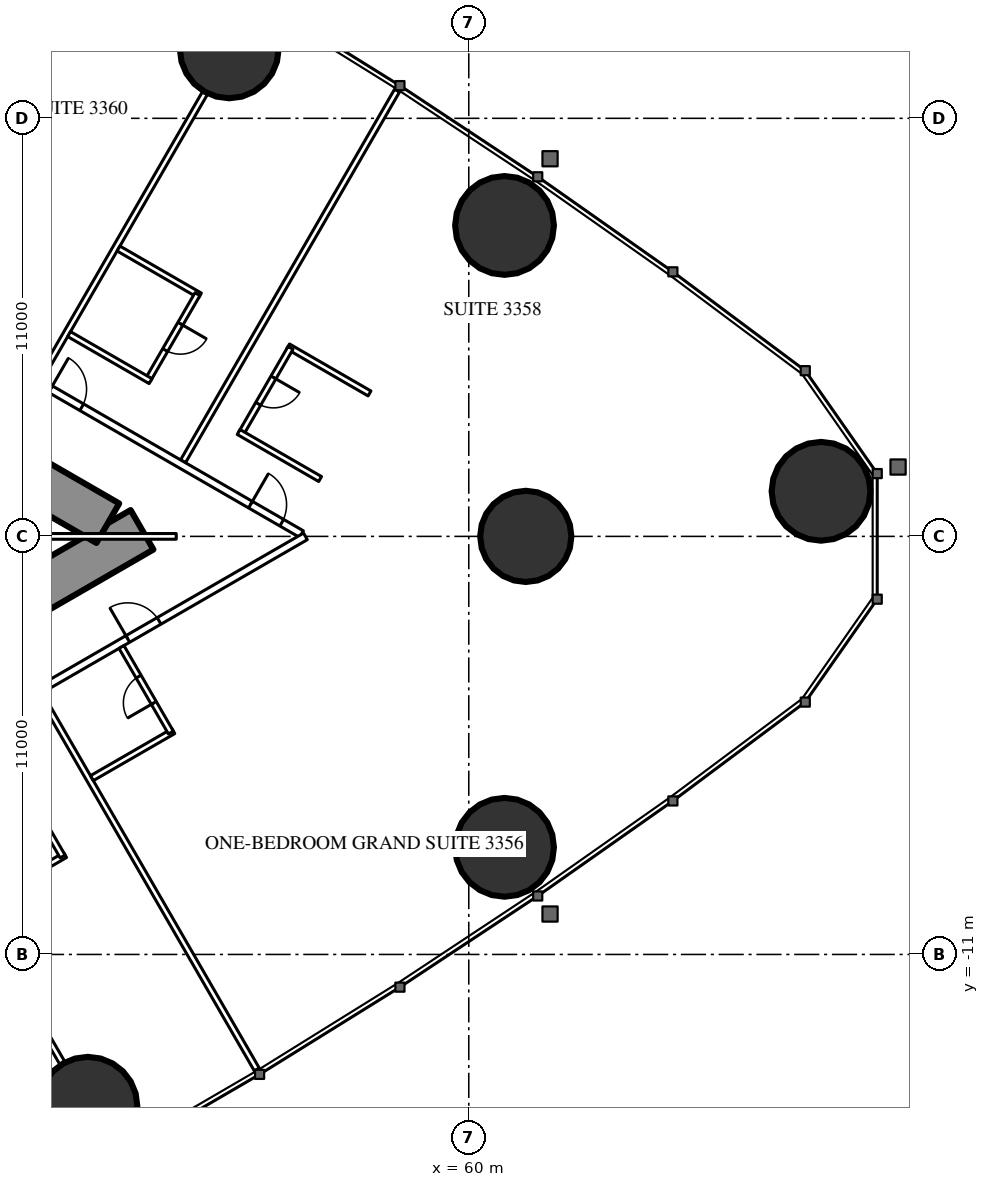
"""IFC4 building model, lengths in metres.
Left out: names, types, materials, properties, quantities, classifications, styles, units other than length and angle.
Written with IfcOpenShell. Run it as: python <this file> out.ifc"""

import sys

from ifc_helpers import new_model, si_unit, direction, frame, frame_2d, origin, origin_2d, place, context, subcontext, project, spatial, rectangle, circle, hollow_circle, extrude, element, fill, save


model = new_model("IFC4")
c1 = context("Model", 3, precision=1e-05, world=origin(), true_north=direction((0.0, 1.0)))
c2 = subcontext(c1, "Body", "Model", "MODEL_VIEW")
j1 = project(units=[si_unit("LENGTHUNIT", "METRE"), si_unit("PLANEANGLEUNIT", "RADIAN")], contexts=[c1])
p1 = place(None, origin())
s1 = spatial("IfcSite", under=j1, at=p1, CompositionType="ELEMENT")
p2 = place(p1, origin())
s2 = spatial("IfcBuilding", under=s1, at=p2, CompositionType="ELEMENT")
p3 = place(p2, frame((0.0, 0.0, 125.6)))
s3 = spatial("IfcBuildingStorey", under=s2, at=p3, CompositionType="ELEMENT", Elevation=125.6)
for number, where, z_axis, x_axis in (
    (1, (69.269, 1.187, 0.0), (0.0, 0.0, 1.0), (1.0, 0.0, 0.0)),
    (2, (60.941, 8.181, 0.0), (0.0, 0.0, 1.0), (1.0, 0.0, 0.0)),
    (3, (53.697, 12.827, 0.0), (0.0, 0.0, 1.0), (1.0, 0.0, 0.0)),
    (4, (49.979, -14.994, 0.0), (0.0, 0.0, 1.0), (1.0, 0.0, 0.0)),
    (5, (60.941, -8.181, 0.0), (0.0, 0.0, 1.0), (1.0, 0.0, 0.0)),
):
    element("IfcColumn", number, at=place(p3, frame(where, z_axis=z_axis, x_axis=x_axis)), inside=s3, PredefinedType="COLUMN", context=c2, shape_type="SweptSolid", body=[
        extrude(hollow_circle(Radius=1.3, WallThickness=0.1, at=origin_2d()), origin(), (0.0, 0.0, 1.0), 3.5),
    ])
p4 = place(p3, frame((61.5, 0.0, 0.0), z_axis=(0.0, 0.0, 1.0), x_axis=(1.0, 0.0, 0.0)))
e6 = element("IfcColumn", 6, at=p4, inside=s3, PredefinedType="COLUMN", context=c2, shape_type="SweptSolid", body=[
    extrude(circle(Radius=1.2, at=origin_2d()), origin(), (0.0, 0.0, 1.0), 3.5),
])
p5 = place(p3, frame((27.2, -13.8, 0.0), z_axis=(0.0, 0.0, 1.0), x_axis=(0.866027159892, 0.499996958321, 0.0)))
e7 = element("IfcWall", 7, at=p5, inside=s3, PredefinedType="SHEAR", context=c2, shape_type="SweptSolid", body=[
    extrude(rectangle(XDim=27.947, YDim=1.2, at=frame_2d((13.973, 0.0))), origin(), (0.0, 0.0, 1.0), 3.5),
])
p6 = place(p5, frame((4.6, 0.0, 0.0)))
e8 = element("IfcOpeningElement", 8, at=p6, cuts=e7, PredefinedType="OPENING", context=c2, shape_type="SweptSolid", body=[
    extrude(rectangle(XDim=1.0, YDim=2.2, at=frame_2d((0.5, 1.1))), frame((0.0, 0.61, 0.0), z_axis=(0.0, -1.0, 0.0), x_axis=(1.0, 0.0, 0.0)), (0.0, 0.0, 1.0), 1.22),
])
p7 = place(p5, frame((13.395, 0.0, 0.0)))
e9 = element("IfcOpeningElement", 9, at=p7, cuts=e7, PredefinedType="OPENING", context=c2, shape_type="SweptSolid", body=[
    extrude(rectangle(XDim=1.8, YDim=2.2, at=frame_2d((0.9, 1.1))), frame((0.0, 0.61, 0.0), z_axis=(0.0, -1.0, 0.0), x_axis=(1.0, 0.0, 0.0)), (0.0, 0.0, 1.0), 1.22),
])
p8 = place(p3, frame((27.2, 13.8, 0.0), z_axis=(0.0, 0.0, 1.0), x_axis=(0.866024515034, -0.500001539357, 0.0)))
e10 = element("IfcWall", 10, at=p8, inside=s3, PredefinedType="SHEAR", context=c2, shape_type="SweptSolid", body=[
    extrude(rectangle(XDim=26.907, YDim=1.2, at=frame_2d((13.454, 0.0))), origin(), (0.0, 0.0, 1.0), 3.5),
])
p9 = place(p8, frame((4.6, 0.0, 0.0)))
e11 = element("IfcOpeningElement", 11, at=p9, cuts=e10, PredefinedType="OPENING", context=c2, shape_type="SweptSolid", body=[
    extrude(rectangle(XDim=1.0, YDim=2.2, at=frame_2d((0.5, 1.1))), frame((0.0, 0.61, 0.0), z_axis=(0.0, -1.0, 0.0), x_axis=(1.0, 0.0, 0.0)), (0.0, 0.0, 1.0), 1.22),
])
p10 = place(p8, frame((13.395, 0.0, 0.0)))
e12 = element("IfcOpeningElement", 12, at=p10, cuts=e10, PredefinedType="OPENING", context=c2, shape_type="SweptSolid", body=[
    extrude(rectangle(XDim=1.8, YDim=2.2, at=frame_2d((0.9, 1.1))), frame((0.0, 0.61, 0.0), z_axis=(0.0, -1.0, 0.0), x_axis=(1.0, 0.0, 0.0)), (0.0, 0.0, 1.0), 1.22),
])
p11 = place(p3, frame((44.954, -6.321, 0.0), z_axis=(0.0, 0.0, 1.0), x_axis=(0.500018676722, -0.866014620505, 0.0)))
e13 = element("IfcWall", 13, at=p11, inside=s3, PredefinedType="PARTITIONING", context=c2, shape_type="SweptSolid", body=[
    extrude(rectangle(XDim=8.704, YDim=0.15, at=frame_2d((4.352, 0.0))), origin(), (0.0, 0.0, 1.0), 2.2),
])
p12 = place(p3, frame((48.719, -4.147, 0.0), z_axis=(0.0, 0.0, 1.0), x_axis=(0.499990498062, -0.866030889661, 0.0)))
e14 = element("IfcWall", 14, at=p12, inside=s3, PredefinedType="PARTITIONING", context=c2, shape_type="SweptSolid", body=[
    extrude(rectangle(XDim=11.406, YDim=0.15, at=frame_2d((5.703, 0.0))), origin(), (0.0, 0.0, 1.0), 3.25),
])
p13 = place(p3, frame((48.719, 4.147, 0.0), z_axis=(0.0, 0.0, 1.0), x_axis=(0.499993328235, 0.866029255696, 0.0)))
e15 = element("IfcWall", 15, at=p13, inside=s3, PredefinedType="PARTITIONING", context=c2, shape_type="SweptSolid", body=[
    extrude(rectangle(XDim=8.686, YDim=0.15, at=frame_2d((4.343, 0.0))), origin(), (0.0, 0.0, 1.0), 2.2),
])
p14 = place(p3, frame((52.481, 1.975, 0.0), z_axis=(0.0, 0.0, 1.0), x_axis=(0.500003867771, 0.866023170714, 0.0)))
e16 = element("IfcWall", 16, at=p14, inside=s3, PredefinedType="PARTITIONING", context=c2, shape_type="SweptSolid", body=[
    extrude(rectangle(XDim=11.265, YDim=0.15, at=frame_2d((5.632, 0.0))), origin(), (0.0, 0.0, 1.0), 3.25),
])
p15 = place(p3, frame((36.834, 10.894, 0.0), z_axis=(0.0, 0.0, 1.0), x_axis=(0.866028157229, -0.499995230863, 0.0)))
e17 = element("IfcWall", 17, at=p15, inside=s3, PredefinedType="PARTITIONING", context=c2, shape_type="SweptSolid", body=[
    extrude(rectangle(XDim=21.667, YDim=0.2, at=frame_2d((10.833, 0.0))), origin(), (0.0, 0.0, 1.0), 3.25),
])
p16 = place(p15, frame((20.117, 0.0, 0.0)))
e18 = element("IfcOpeningElement", 18, at=p16, cuts=e17, PredefinedType="OPENING", context=c2, shape_type="SweptSolid", body=[
    extrude(rectangle(XDim=0.95, YDim=2.2, at=frame_2d((0.475, 1.1))), frame((0.0, 0.11, 0.0), z_axis=(0.0, -1.0, 0.0), x_axis=(1.0, 0.0, 0.0)), (0.0, 0.0, 1.0), 0.22),
])
p17 = place(p15, frame((14.04, 0.0, 0.0)))
e19 = element("IfcOpeningElement", 19, at=p17, cuts=e17, PredefinedType="OPENING", context=c2, shape_type="SweptSolid", body=[
    extrude(rectangle(XDim=0.95, YDim=2.2, at=frame_2d((0.475, 1.1))), frame((0.0, 0.11, 0.0), z_axis=(0.0, -1.0, 0.0), x_axis=(1.0, 0.0, 0.0)), (0.0, 0.0, 1.0), 0.22),
])
p18 = place(p15, frame((7.697, 0.0, 0.0)))
e20 = element("IfcOpeningElement", 20, at=p18, cuts=e17, PredefinedType="OPENING", context=c2, shape_type="SweptSolid", body=[
    extrude(rectangle(XDim=0.95, YDim=2.2, at=frame_2d((0.475, 1.1))), frame((0.0, 0.11, 0.0), z_axis=(0.0, -1.0, 0.0), x_axis=(1.0, 0.0, 0.0)), (0.0, 0.0, 1.0), 0.22),
])
p19 = place(p15, frame((3.35, 0.0, 0.0)))
e21 = element("IfcOpeningElement", 21, at=p19, cuts=e17, PredefinedType="OPENING", context=c2, shape_type="SweptSolid", body=[
    extrude(rectangle(XDim=1.0, YDim=2.2, at=frame_2d((0.5, 1.1))), frame((0.0, 0.11, 0.0), z_axis=(0.0, -1.0, 0.0), x_axis=(1.0, 0.0, 0.0)), (0.0, 0.0, 1.0), 0.22),
])
p20 = place(p3, frame((44.925, -6.222, 0.0), z_axis=(0.0, 0.0, 1.0), x_axis=(0.866020269055, 0.500008893506, 0.0)))
e22 = element("IfcWall", 22, at=p20, inside=s3, PredefinedType="PARTITIONING", context=c2, shape_type="SweptSolid", body=[
    extrude(rectangle(XDim=12.444, YDim=0.2, at=frame_2d((6.222, 0.0))), origin(), (0.0, 0.0, 1.0), 3.25),
])
p21 = place(p20, frame((0.6, 0.0, 0.0)))
e23 = element("IfcOpeningElement", 23, at=p21, cuts=e22, PredefinedType="OPENING", context=c2, shape_type="SweptSolid", body=[
    extrude(rectangle(XDim=0.95, YDim=2.2, at=frame_2d((0.475, 1.1))), frame((0.0, 0.11, 0.0), z_axis=(0.0, -1.0, 0.0), x_axis=(1.0, 0.0, 0.0)), (0.0, 0.0, 1.0), 0.22),
])
p22 = place(p20, frame((7.047, 0.0, 0.0)))
e24 = element("IfcOpeningElement", 24, at=p22, cuts=e22, PredefinedType="OPENING", context=c2, shape_type="SweptSolid", body=[
    extrude(rectangle(XDim=0.95, YDim=2.2, at=frame_2d((0.475, 1.1))), frame((0.0, 0.11, 0.0), z_axis=(0.0, -1.0, 0.0), x_axis=(1.0, 0.0, 0.0)), (0.0, 0.0, 1.0), 0.22),
])
p23 = place(p3, frame((47.235, -9.623, 0.0), z_axis=(0.0, 0.0, 1.0), x_axis=(0.866006523861, 0.500032699561, 0.0)))
e25 = element("IfcWall", 25, at=p23, inside=s3, PredefinedType="PARTITIONING", context=c2, shape_type="SweptSolid", body=[
    extrude(rectangle(XDim=2.475, YDim=0.15, at=frame_2d((1.237, 0.0))), origin(), (0.0, 0.0, 1.0), 3.25),
])
p24 = place(p3, frame((48.013, -6.171, 0.0), z_axis=(0.0, 0.0, 1.0), x_axis=(0.500006934395, -0.866021400173, 0.0)))
e26 = element("IfcWall", 26, at=p24, inside=s3, PredefinedType="PARTITIONING", context=c2, shape_type="SweptSolid", body=[
    extrude(rectangle(XDim=2.6, YDim=0.15, at=frame_2d((1.3, 0.0))), origin(), (0.0, 0.0, 1.0), 3.25),
])
p25 = place(p24, frame((0.9, 0.0, 0.0)))
e27 = element("IfcOpeningElement", 27, at=p25, cuts=e26, PredefinedType="OPENING", context=c2, shape_type="SweptSolid", body=[
    extrude(rectangle(XDim=0.8, YDim=2.2, at=frame_2d((0.4, 1.1))), frame((0.0, 0.085, 0.0), z_axis=(0.0, -1.0, 0.0), x_axis=(1.0, 0.0, 0.0)), (0.0, 0.0, 1.0), 0.17),
])
p26 = place(p3, frame((50.083, -6.362, 0.0), z_axis=(0.0, 0.0, 1.0), x_axis=(0.866006523861, 0.500032699561, 0.0)))
e28 = element("IfcWall", 28, at=p26, inside=s3, PredefinedType="PARTITIONING", context=c2, shape_type="SweptSolid", body=[
    extrude(rectangle(XDim=2.475, YDim=0.15, at=frame_2d((1.237, 0.0))), origin(), (0.0, 0.0, 1.0), 3.25),
])
p27 = place(p3, frame((50.862, -2.91, 0.0), z_axis=(0.0, 0.0, 1.0), x_axis=(0.500047596559, -0.865997922154, 0.0)))
e29 = element("IfcWall", 29, at=p27, inside=s3, PredefinedType="PARTITIONING", context=c2, shape_type="SweptSolid", body=[
    extrude(rectangle(XDim=2.6, YDim=0.15, at=frame_2d((1.3, 0.0))), origin(), (0.0, 0.0, 1.0), 3.25),
])
p28 = place(p27, frame((0.9, 0.0, 0.0)))
e30 = element("IfcOpeningElement", 30, at=p28, cuts=e29, PredefinedType="OPENING", context=c2, shape_type="SweptSolid", body=[
    extrude(rectangle(XDim=0.8, YDim=2.2, at=frame_2d((0.4, 1.1))), frame((0.0, 0.085, 0.0), z_axis=(0.0, -1.0, 0.0), x_axis=(1.0, 0.0, 0.0)), (0.0, 0.0, 1.0), 0.17),
])
p29 = place(p3, frame((55.245, 4.998, 0.0), z_axis=(0.0, 0.0, 1.0), x_axis=(0.866006523861, -0.500032699561, 0.0)))
e31 = element("IfcWall", 31, at=p29, inside=s3, PredefinedType="PARTITIONING", context=c2, shape_type="SweptSolid", body=[
    extrude(rectangle(XDim=2.475, YDim=0.15, at=frame_2d((1.237, 0.0))), origin(), (0.0, 0.0, 1.0), 3.25),
])
p30 = place(p3, frame((54.01, 2.709, 0.0), z_axis=(0.0, 0.0, 1.0), x_axis=(0.500006934395, 0.866021400173, 0.0)))
e32 = element("IfcWall", 32, at=p30, inside=s3, PredefinedType="PARTITIONING", context=c2, shape_type="SweptSolid", body=[
    extrude(rectangle(XDim=2.6, YDim=0.15, at=frame_2d((1.3, 0.0))), origin(), (0.0, 0.0, 1.0), 3.25),
])
p31 = place(p30, frame((0.9, 0.0, 0.0)))
e33 = element("IfcOpeningElement", 33, at=p31, cuts=e32, PredefinedType="OPENING", context=c2, shape_type="SweptSolid", body=[
    extrude(rectangle(XDim=0.8, YDim=2.2, at=frame_2d((0.4, 1.1))), frame((0.0, 0.085, 0.0), z_axis=(0.0, -1.0, 0.0), x_axis=(1.0, 0.0, 0.0)), (0.0, 0.0, 1.0), 0.17),
])
p32 = place(p3, frame((53.945, 2.747, 0.0), z_axis=(0.0, 0.0, 1.0), x_axis=(0.866031185235, -0.4999899861, 0.0)))
e34 = element("IfcWall", 34, at=p32, inside=s3, PredefinedType="PARTITIONING", context=c2, shape_type="SweptSolid", body=[
    extrude(rectangle(XDim=2.475, YDim=0.15, at=frame_2d((1.238, 0.0))), origin(), (0.0, 0.0, 1.0), 3.25),
])
p33 = place(p3, frame((50.783, 7.574, 0.0), z_axis=(0.0, 0.0, 1.0), x_axis=(0.866006523861, -0.500032699561, 0.0)))
e35 = element("IfcWall", 35, at=p33, inside=s3, PredefinedType="PARTITIONING", context=c2, shape_type="SweptSolid", body=[
    extrude(rectangle(XDim=2.475, YDim=0.15, at=frame_2d((1.237, 0.0))), origin(), (0.0, 0.0, 1.0), 3.25),
])
p34 = place(p3, frame((51.562, 4.123, 0.0), z_axis=(0.0, 0.0, 1.0), x_axis=(0.49997716683, 0.86603858612, 0.0)))
e36 = element("IfcWall", 36, at=p34, inside=s3, PredefinedType="PARTITIONING", context=c2, shape_type="SweptSolid", body=[
    extrude(rectangle(XDim=2.6, YDim=0.15, at=frame_2d((1.3, 0.0))), origin(), (0.0, 0.0, 1.0), 3.25),
])
p35 = place(p34, frame((0.9, 0.0, 0.0)))
e37 = element("IfcOpeningElement", 37, at=p35, cuts=e36, PredefinedType="OPENING", context=c2, shape_type="SweptSolid", body=[
    extrude(rectangle(XDim=0.8, YDim=2.2, at=frame_2d((0.4, 1.1))), frame((0.0, 0.085, 0.0), z_axis=(0.0, -1.0, 0.0), x_axis=(1.0, 0.0, 0.0)), (0.0, 0.0, 1.0), 0.17),
])
p36 = place(p3, frame((49.483, 5.323, 0.0), z_axis=(0.0, 0.0, 1.0), x_axis=(0.866031185235, -0.4999899861, 0.0)))
e38 = element("IfcWall", 38, at=p36, inside=s3, PredefinedType="PARTITIONING", context=c2, shape_type="SweptSolid", body=[
    extrude(rectangle(XDim=2.475, YDim=0.15, at=frame_2d((1.238, 0.0))), origin(), (0.0, 0.0, 1.0), 3.25),
])
p37 = place(p3, frame((44.575, 0.0, 0.0), z_axis=(0.0, 0.0, 1.0), x_axis=(1.0, 0.0, 0.0)))
e39 = element("IfcWall", 39, at=p37, inside=s3, PredefinedType="PARTITIONING", context=c2, shape_type="SweptSolid", body=[
    extrude(rectangle(XDim=7.727, YDim=0.15, at=frame_2d((3.864, 0.0))), origin(), (0.0, 0.0, 1.0), 2.2),
])
p38 = place(p28, origin())
e40 = element("IfcDoor", 40, at=p38, inside=s3, OperationType="SINGLE_SWING_RIGHT", PredefinedType="DOOR", context=c2, shape_type="SweptSolid", body=[
    extrude(rectangle(XDim=0.8, YDim=2.2, at=frame_2d((0.4, 1.1))), frame((0.0, 0.025, 0.0), z_axis=(0.0, -1.0, 0.0), x_axis=(1.0, 0.0, 0.0)), (0.0, 0.0, 1.0), 0.05),
])
fill(e30, e40)
p39 = place(p22, origin())
e41 = element("IfcDoor", 41, at=p39, inside=s3, OperationType="SINGLE_SWING_LEFT", PredefinedType="DOOR", context=c2, shape_type="SweptSolid", body=[
    extrude(rectangle(XDim=0.95, YDim=2.2, at=frame_2d((0.475, 1.1))), frame((0.0, 0.025, 0.0), z_axis=(0.0, -1.0, 0.0), x_axis=(1.0, 0.0, 0.0)), (0.0, 0.0, 1.0), 0.05),
])
fill(e24, e41)
p40 = place(p31, origin())
e42 = element("IfcDoor", 42, at=p40, inside=s3, OperationType="SINGLE_SWING_RIGHT", PredefinedType="DOOR", context=c2, shape_type="SweptSolid", body=[
    extrude(rectangle(XDim=0.8, YDim=2.2, at=frame_2d((0.4, 1.1))), frame((0.0, 0.025, 0.0), z_axis=(0.0, -1.0, 0.0), x_axis=(1.0, 0.0, 0.0)), (0.0, 0.0, 1.0), 0.05),
])
fill(e33, e42)
p41 = place(p16, origin())
e43 = element("IfcDoor", 43, at=p41, inside=s3, OperationType="SINGLE_SWING_LEFT", PredefinedType="DOOR", context=c2, shape_type="SweptSolid", body=[
    extrude(rectangle(XDim=0.95, YDim=2.2, at=frame_2d((0.475, 1.1))), frame((0.0, 0.025, 0.0), z_axis=(0.0, -1.0, 0.0), x_axis=(1.0, 0.0, 0.0)), (0.0, 0.0, 1.0), 0.05),
])
fill(e18, e43)
p42 = place(p35, origin())
e44 = element("IfcDoor", 44, at=p42, inside=s3, OperationType="SINGLE_SWING_RIGHT", PredefinedType="DOOR", context=c2, shape_type="SweptSolid", body=[
    extrude(rectangle(XDim=0.8, YDim=2.2, at=frame_2d((0.4, 1.1))), frame((0.0, 0.025, 0.0), z_axis=(0.0, -1.0, 0.0), x_axis=(1.0, 0.0, 0.0)), (0.0, 0.0, 1.0), 0.05),
])
fill(e37, e44)
p43 = place(p17, origin())
e45 = element("IfcDoor", 45, at=p43, inside=s3, OperationType="SINGLE_SWING_LEFT", PredefinedType="DOOR", context=c2, shape_type="SweptSolid", body=[
    extrude(rectangle(XDim=0.95, YDim=2.2, at=frame_2d((0.475, 1.1))), frame((0.0, 0.025, 0.0), z_axis=(0.0, -1.0, 0.0), x_axis=(1.0, 0.0, 0.0)), (0.0, 0.0, 1.0), 0.05),
])
fill(e19, e45)
save(model, sys.argv[1])
